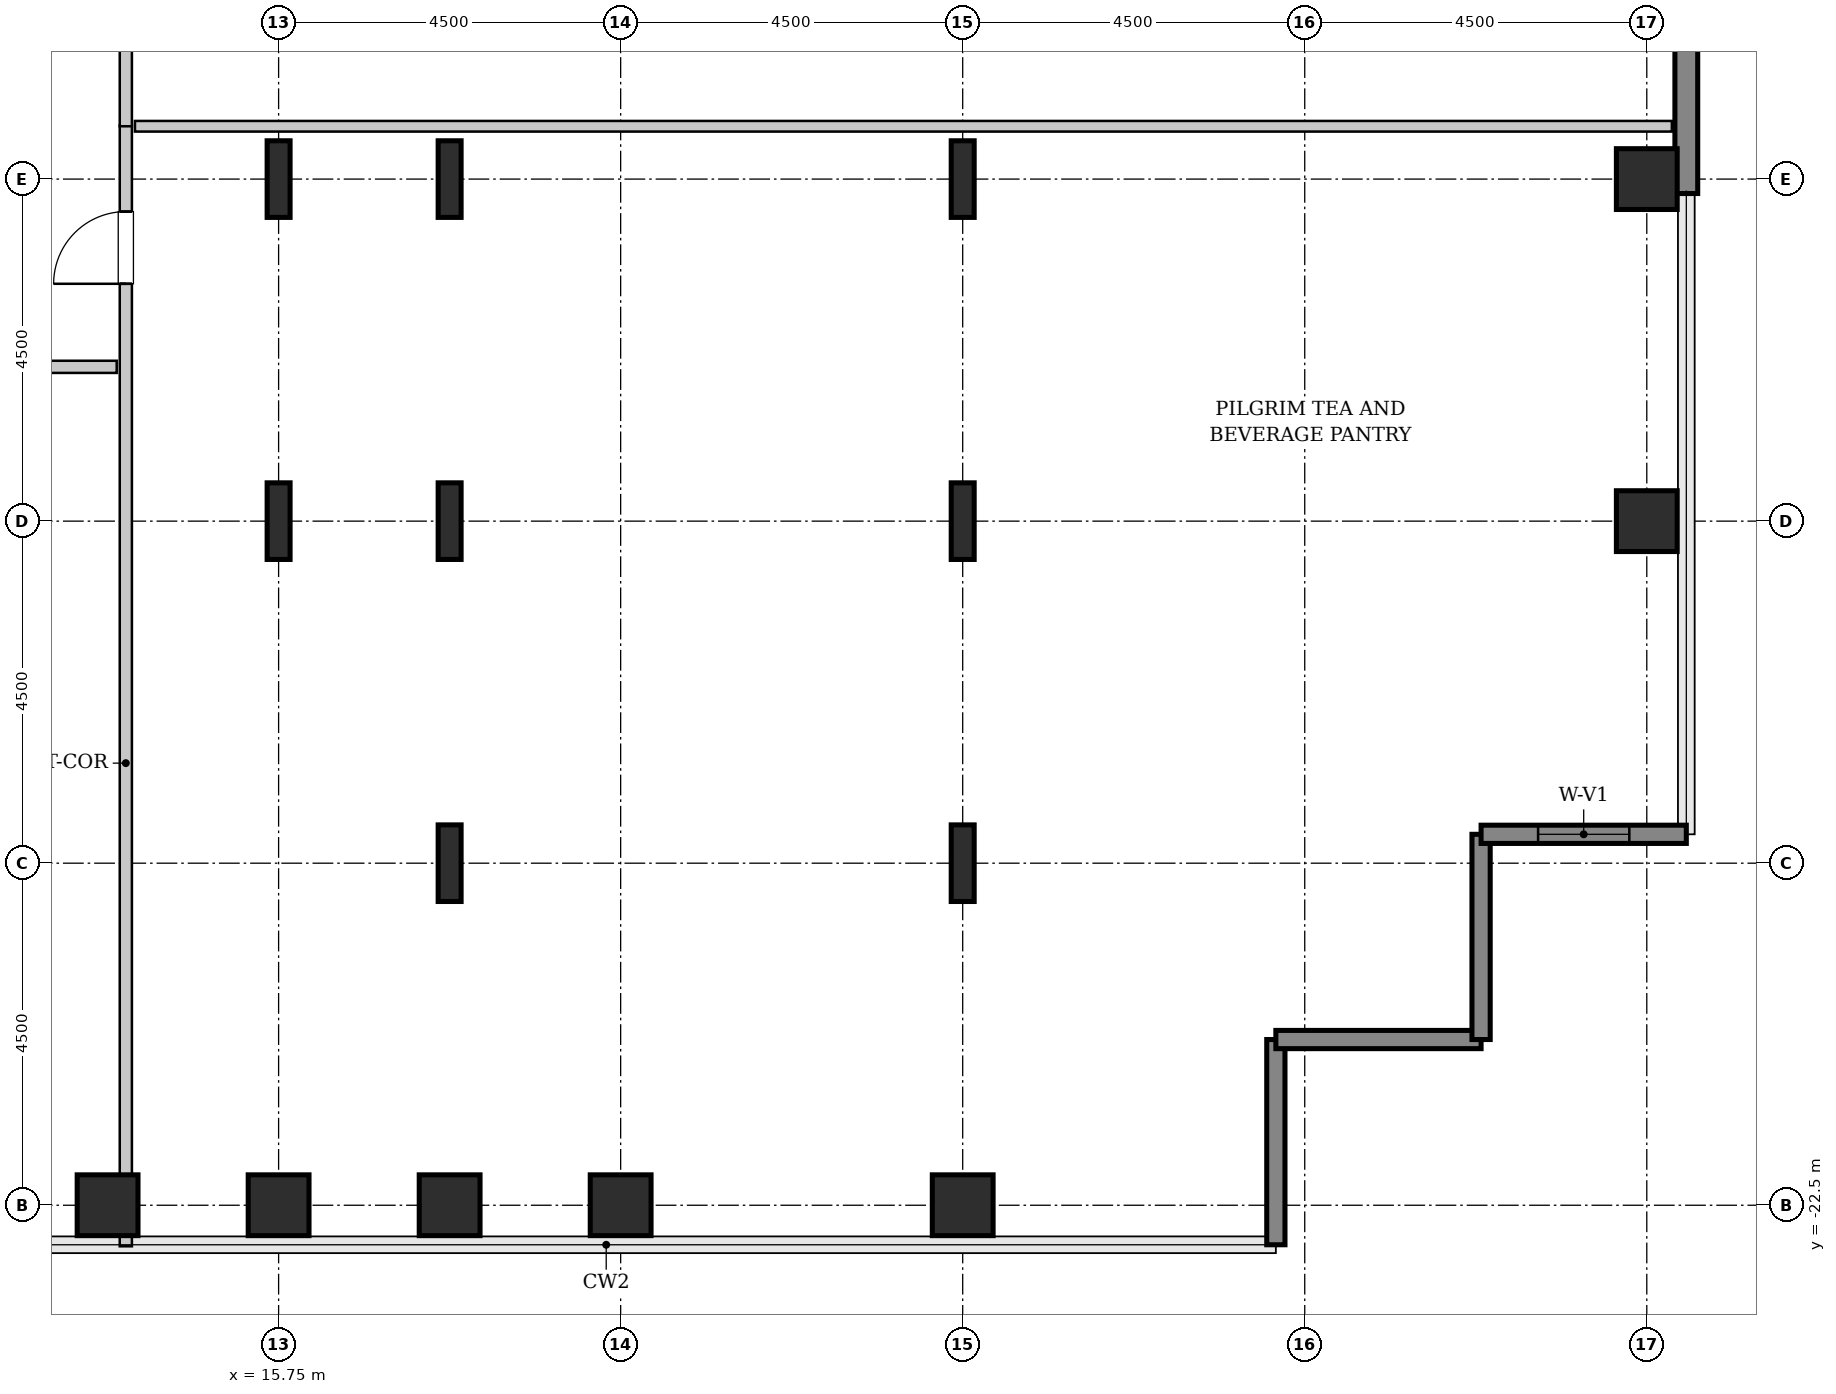
"""IFC4 building model, lengths in metres.
Left out: names, types, materials, properties, quantities, classifications, styles, units other than length and angle.
Written with IfcOpenShell. Run it as: python <this file> out.ifc"""

import sys

from ifc_helpers import new_model, si_unit, direction, frame, frame_2d, origin, origin_2d, place, context, subcontext, project, spatial, rectangle, hollow_rectangle, i_section, extrude, source, transform, mapped, element, fill, save


model = new_model("IFC4")
c1 = context("Model", 3, precision=1e-05, world=origin(), true_north=direction((0.0, 1.0)))
c2 = subcontext(c1, "Body", "Model", "MODEL_VIEW")
j1 = project(units=[si_unit("LENGTHUNIT", "METRE"), si_unit("PLANEANGLEUNIT", "RADIAN")], contexts=[c1])
p1 = place(None, origin())
s1 = spatial("IfcSite", under=j1, at=p1, CompositionType="ELEMENT")
p2 = place(p1, origin())
s2 = spatial("IfcBuilding", under=s1, at=p2, CompositionType="ELEMENT")
p3 = place(p2, frame((0.0, 0.0, 125.0)))
s3 = spatial("IfcBuildingStorey", under=s2, at=p3, CompositionType="ELEMENT", Elevation=125.0)
m1 = source(origin(), c2, "Body", "SweptSolid", [
    extrude(hollow_rectangle(XDim=0.8, YDim=0.8, WallThickness=0.04, InnerFilletRadius=0.04, OuterFilletRadius=0.08, at=origin_2d()), origin(), (0.0, 0.0, 1.0), 3.8),
])
for number, where, z_axis, x_axis in (
    (1, (13.5, -22.5, 0.0), (0.0, 0.0, 1.0), (1.0, 0.0, 0.0)),
    (2, (15.75, -22.5, 0.0), (0.0, 0.0, 1.0), (1.0, 0.0, 0.0)),
):
    element("IfcColumn", number, at=place(p3, frame(where, z_axis=z_axis, x_axis=x_axis)), inside=s3, PredefinedType="COLUMN", context=c2, shape_type="MappedRepresentation", body=[
        mapped(m1, transform((0.0, 0.0, 0.0), x_axis=(1.0, 0.0, 0.0), y_axis=(0.0, 1.0, 0.0), z_axis=(0.0, 0.0, 1.0), scale=1.0)),
    ])
m2 = source(origin(), c2, "Body", "SweptSolid", [
    extrude(i_section(OverallWidth=0.302, OverallDepth=1.008, WebThickness=0.021, FlangeThickness=0.04, FilletRadius=0.03, at=origin_2d()), origin(), (0.0, 0.0, 1.0), 3.8),
])
for number, where, z_axis, x_axis in (
    (3, (15.75, -13.5, 0.0), (0.0, 0.0, 1.0), (1.0, 0.0, 0.0)),
    (4, (15.75, -9.0, 0.0), (0.0, 0.0, 1.0), (1.0, 0.0, 0.0)),
):
    element("IfcColumn", number, at=place(p3, frame(where, z_axis=z_axis, x_axis=x_axis)), inside=s3, PredefinedType="COLUMN", context=c2, shape_type="MappedRepresentation", body=[
        mapped(m2, transform((0.0, 0.0, 0.0), x_axis=(1.0, 0.0, 0.0), y_axis=(0.0, 1.0, 0.0), z_axis=(0.0, 0.0, 1.0), scale=1.0)),
    ])
p4 = place(p3, frame((18.0, -22.5, 0.0), z_axis=(0.0, 0.0, 1.0), x_axis=(1.0, 0.0, 0.0)))
e5 = element("IfcColumn", 5, at=p4, inside=s3, PredefinedType="COLUMN", context=c2, shape_type="MappedRepresentation", body=[
    mapped(m1, transform((0.0, 0.0, 0.0), x_axis=(1.0, 0.0, 0.0), y_axis=(0.0, 1.0, 0.0), z_axis=(0.0, 0.0, 1.0), scale=1.0)),
])
for number, where, z_axis, x_axis in (
    (6, (18.0, -18.0, 0.0), (0.0, 0.0, 1.0), (1.0, 0.0, 0.0)),
    (7, (18.0, -13.5, 0.0), (0.0, 0.0, 1.0), (1.0, 0.0, 0.0)),
    (8, (18.0, -9.0, 0.0), (0.0, 0.0, 1.0), (1.0, 0.0, 0.0)),
):
    element("IfcColumn", number, at=place(p3, frame(where, z_axis=z_axis, x_axis=x_axis)), inside=s3, PredefinedType="COLUMN", context=c2, shape_type="MappedRepresentation", body=[
        mapped(m2, transform((0.0, 0.0, 0.0), x_axis=(1.0, 0.0, 0.0), y_axis=(0.0, 1.0, 0.0), z_axis=(0.0, 0.0, 1.0), scale=1.0)),
    ])
for number, where, z_axis, x_axis in (
    (9, (20.25, -22.5, 0.0), (0.0, 0.0, 1.0), (1.0, 0.0, 0.0)),
    (10, (24.75, -22.5, 0.0), (0.0, 0.0, 1.0), (1.0, 0.0, 0.0)),
):
    element("IfcColumn", number, at=place(p3, frame(where, z_axis=z_axis, x_axis=x_axis)), inside=s3, PredefinedType="COLUMN", context=c2, shape_type="MappedRepresentation", body=[
        mapped(m1, transform((0.0, 0.0, 0.0), x_axis=(1.0, 0.0, 0.0), y_axis=(0.0, 1.0, 0.0), z_axis=(0.0, 0.0, 1.0), scale=1.0)),
    ])
for number, where, z_axis, x_axis in (
    (11, (24.75, -18.0, 0.0), (0.0, 0.0, 1.0), (1.0, 0.0, 0.0)),
    (12, (24.75, -13.5, 0.0), (0.0, 0.0, 1.0), (1.0, 0.0, 0.0)),
    (13, (24.75, -9.0, 0.0), (0.0, 0.0, 1.0), (1.0, 0.0, 0.0)),
):
    element("IfcColumn", number, at=place(p3, frame(where, z_axis=z_axis, x_axis=x_axis)), inside=s3, PredefinedType="COLUMN", context=c2, shape_type="MappedRepresentation", body=[
        mapped(m2, transform((0.0, 0.0, 0.0), x_axis=(1.0, 0.0, 0.0), y_axis=(0.0, 1.0, 0.0), z_axis=(0.0, 0.0, 1.0), scale=1.0)),
    ])
for number, where, z_axis, x_axis in (
    (14, (33.75, -13.5, 0.0), (0.0, 0.0, 1.0), (1.0, 0.0, 0.0)),
    (15, (33.75, -9.0, 0.0), (0.0, 0.0, 1.0), (1.0, 0.0, 0.0)),
):
    element("IfcColumn", number, at=place(p3, frame(where, z_axis=z_axis, x_axis=x_axis)), inside=s3, PredefinedType="COLUMN", context=c2, shape_type="MappedRepresentation", body=[
        mapped(m1, transform((0.0, 0.0, 0.0), x_axis=(1.0, 0.0, 0.0), y_axis=(0.0, 1.0, 0.0), z_axis=(0.0, 0.0, 1.0), scale=1.0)),
    ])
m3 = source(origin(), c2, "Body", "SweptSolid", [
    extrude(rectangle(XDim=4.88, YDim=0.3, at=frame_2d((2.44, 0.0))), origin(), (0.0, 0.0, 1.0), 3.55),
])
p5 = place(p3, frame((34.27, -9.19, 0.0), z_axis=(0.0, 0.0, 1.0), x_axis=(0.0, 1.0, 0.0)))
e16 = element("IfcWall", 16, at=p5, inside=s3, PredefinedType="SHEAR", context=c2, shape_type="MappedRepresentation", body=[
    mapped(m3, transform((0.0, 0.0, 0.0), x_axis=(1.0, 0.0, 0.0), y_axis=(0.0, 1.0, 0.0), z_axis=(0.0, 0.0, 1.0), scale=1.0)),
])
m4 = source(origin(), c2, "Body", "SweptSolid", [
    extrude(rectangle(XDim=2.7, YDim=0.24, at=frame_2d((1.35, 0.0))), origin(), (0.0, 0.0, 1.0), 3.55),
])
for number, where, z_axis, x_axis in (
    (17, (28.87, -23.02, 0.0), (0.0, 0.0, 1.0), (0.0, 1.0, 0.0)),
    (18, (28.87, -20.32, 0.0), (0.0, 0.0, 1.0), (1.0, 0.0, 0.0)),
    (19, (31.57, -20.32, 0.0), (0.0, 0.0, 1.0), (0.0, 1.0, 0.0)),
):
    element("IfcWall", number, at=place(p3, frame(where, z_axis=z_axis, x_axis=x_axis)), inside=s3, PredefinedType="SHEAR", context=c2, shape_type="MappedRepresentation", body=[
        mapped(m4, transform((0.0, 0.0, 0.0), x_axis=(1.0, 0.0, 0.0), y_axis=(0.0, 1.0, 0.0), z_axis=(0.0, 0.0, 1.0), scale=1.0)),
    ])
p6 = place(p3, frame((31.57, -17.62, 0.0), z_axis=(0.0, 0.0, 1.0), x_axis=(1.0, 0.0, 0.0)))
e20 = element("IfcWall", 20, at=p6, inside=s3, PredefinedType="SHEAR", context=c2, shape_type="MappedRepresentation", body=[
    mapped(m4, transform((0.0, 0.0, 0.0), x_axis=(1.0, 0.0, 0.0), y_axis=(0.0, 1.0, 0.0), z_axis=(0.0, 0.0, 1.0), scale=1.0)),
])
p7 = place(p6, frame((0.75, 0.0, 0.85)))
e21 = element("IfcOpeningElement", 21, at=p7, cuts=e20, PredefinedType="OPENING", context=c2, shape_type="SweptSolid", body=[
    extrude(rectangle(XDim=1.2, YDim=1.8, at=frame_2d((0.6, 0.9))), frame((0.0, 0.13, 0.0), z_axis=(0.0, -1.0, 0.0), x_axis=(1.0, 0.0, 0.0)), (0.0, 0.0, 1.0), 0.26),
])
m5 = source(origin(), c2, "Body", "SweptSolid", [
    extrude(rectangle(XDim=14.745, YDim=0.16, at=frame_2d((7.373, 0.0))), origin(), (0.0, 0.0, 1.0), 3.535),
])
p8 = place(p3, frame((13.74, -23.04, 0.0), z_axis=(0.0, 0.0, 1.0), x_axis=(0.0, 1.0, 0.0)))
e22 = element("IfcWall", 22, at=p8, inside=s3, PredefinedType="PARTITIONING", context=c2, shape_type="MappedRepresentation", body=[
    mapped(m5, transform((0.0, 0.0, 0.0), x_axis=(1.0, 0.0, 0.0), y_axis=(0.0, 1.0, 0.0), z_axis=(0.0, 0.0, 1.0), scale=1.0)),
])
p9 = place(p8, frame((12.663, 0.0, 0.0)))
e23 = element("IfcOpeningElement", 23, at=p9, cuts=e22, PredefinedType="OPENING", context=c2, shape_type="SweptSolid", body=[
    extrude(rectangle(XDim=0.95, YDim=2.1, at=frame_2d((0.475, 1.05))), frame((0.0, 0.09, 0.0), z_axis=(0.0, -1.0, 0.0), x_axis=(1.0, 0.0, 0.0)), (0.0, 0.0, 1.0), 0.18),
])
m6 = source(origin(), c2, "Body", "SweptSolid", [
    extrude(rectangle(XDim=20.22, YDim=0.14, at=frame_2d((10.11, 0.0))), origin(), (0.0, 0.0, 1.0), 3.535),
])
p10 = place(p3, frame((13.86, -8.305, 0.0), z_axis=(0.0, 0.0, 1.0), x_axis=(1.0, 0.0, 0.0)))
e24 = element("IfcWall", 24, at=p10, inside=s3, PredefinedType="PARTITIONING", context=c2, shape_type="MappedRepresentation", body=[
    mapped(m6, transform((0.0, 0.0, 0.0), x_axis=(1.0, 0.0, 0.0), y_axis=(0.0, 1.0, 0.0), z_axis=(0.0, 0.0, 1.0), scale=1.0)),
])
m7 = source(origin(), c2, "Body", "SweptSolid", [
    extrude(rectangle(XDim=3.51, YDim=0.16, at=frame_2d((1.755, 0.0))), origin(), (0.0, 0.0, 1.0), 3.535),
])
p11 = place(p3, frame((13.74, -8.305, 0.0), z_axis=(0.0, 0.0, 1.0), x_axis=(0.0, 1.0, 0.0)))
e25 = element("IfcWall", 25, at=p11, inside=s3, PredefinedType="PARTITIONING", context=c2, shape_type="MappedRepresentation", body=[
    mapped(m7, transform((0.0, 0.0, 0.0), x_axis=(1.0, 0.0, 0.0), y_axis=(0.0, 1.0, 0.0), z_axis=(0.0, 0.0, 1.0), scale=1.0)),
])
p12 = place(p11, frame((1.28, 0.0, 0.0)))
e26 = element("IfcOpeningElement", 26, at=p12, cuts=e25, PredefinedType="OPENING", context=c2, shape_type="SweptSolid", body=[
    extrude(rectangle(XDim=0.95, YDim=2.1, at=frame_2d((0.475, 1.05))), frame((0.0, 0.09, 0.0), z_axis=(0.0, -1.0, 0.0), x_axis=(1.0, 0.0, 0.0)), (0.0, 0.0, 1.0), 0.18),
])
m8 = source(origin(), c2, "Body", "SweptSolid", [
    extrude(rectangle(XDim=4.36, YDim=0.16, at=frame_2d((2.18, 0.0))), origin(), (0.0, 0.0, 1.0), 3.535),
])
p13 = place(p3, frame((9.26, -11.47, 0.0), z_axis=(0.0, 0.0, 1.0), x_axis=(1.0, 0.0, 0.0)))
e27 = element("IfcWall", 27, at=p13, inside=s3, PredefinedType="PARTITIONING", context=c2, shape_type="MappedRepresentation", body=[
    mapped(m8, transform((0.0, 0.0, 0.0), x_axis=(1.0, 0.0, 0.0), y_axis=(0.0, 1.0, 0.0), z_axis=(0.0, 0.0, 1.0), scale=1.0)),
])
p14 = place(p13, frame((1.705, 0.0, 0.0)))
e28 = element("IfcOpeningElement", 28, at=p14, cuts=e27, PredefinedType="OPENING", context=c2, shape_type="SweptSolid", body=[
    extrude(rectangle(XDim=0.95, YDim=2.1, at=frame_2d((0.475, 1.05))), frame((0.0, 0.09, 0.0), z_axis=(0.0, -1.0, 0.0), x_axis=(1.0, 0.0, 0.0)), (0.0, 0.0, 1.0), 0.18),
])
m9 = source(origin(), c2, "Body", "SweptSolid", [
    extrude(rectangle(XDim=1.2, YDim=1.8, at=frame_2d((0.6, 0.9))), frame((0.0, 0.03, 0.0), z_axis=(0.0, -1.0, 0.0), x_axis=(1.0, 0.0, 0.0)), (0.0, 0.0, 1.0), 0.06),
])
p15 = place(p7, origin())
e29 = element("IfcWindow", 29, at=p15, inside=s3, PartitioningType="SINGLE_PANEL", PredefinedType="WINDOW", context=c2, shape_type="MappedRepresentation", body=[
    mapped(m9, transform((0.0, 0.0, 0.0), x_axis=(1.0, 0.0, 0.0), y_axis=(0.0, 1.0, 0.0), z_axis=(0.0, 0.0, 1.0), scale=1.0)),
])
fill(e21, e29)
m10 = source(origin(), c2, "Body", "SweptSolid", [
    extrude(rectangle(XDim=0.95, YDim=2.1, at=frame_2d((0.475, 1.05))), frame((0.0, 0.025, 0.0), z_axis=(0.0, -1.0, 0.0), x_axis=(1.0, 0.0, 0.0)), (0.0, 0.0, 1.0), 0.05),
])
p16 = place(p9, origin())
e30 = element("IfcDoor", 30, at=p16, inside=s3, OperationType="SINGLE_SWING_LEFT", PredefinedType="DOOR", context=c2, shape_type="MappedRepresentation", body=[
    mapped(m10, transform((0.0, 0.0, 0.0), x_axis=(1.0, 0.0, 0.0), y_axis=(0.0, 1.0, 0.0), z_axis=(0.0, 0.0, 1.0), scale=1.0)),
])
fill(e23, e30)
save(model, sys.argv[1])
